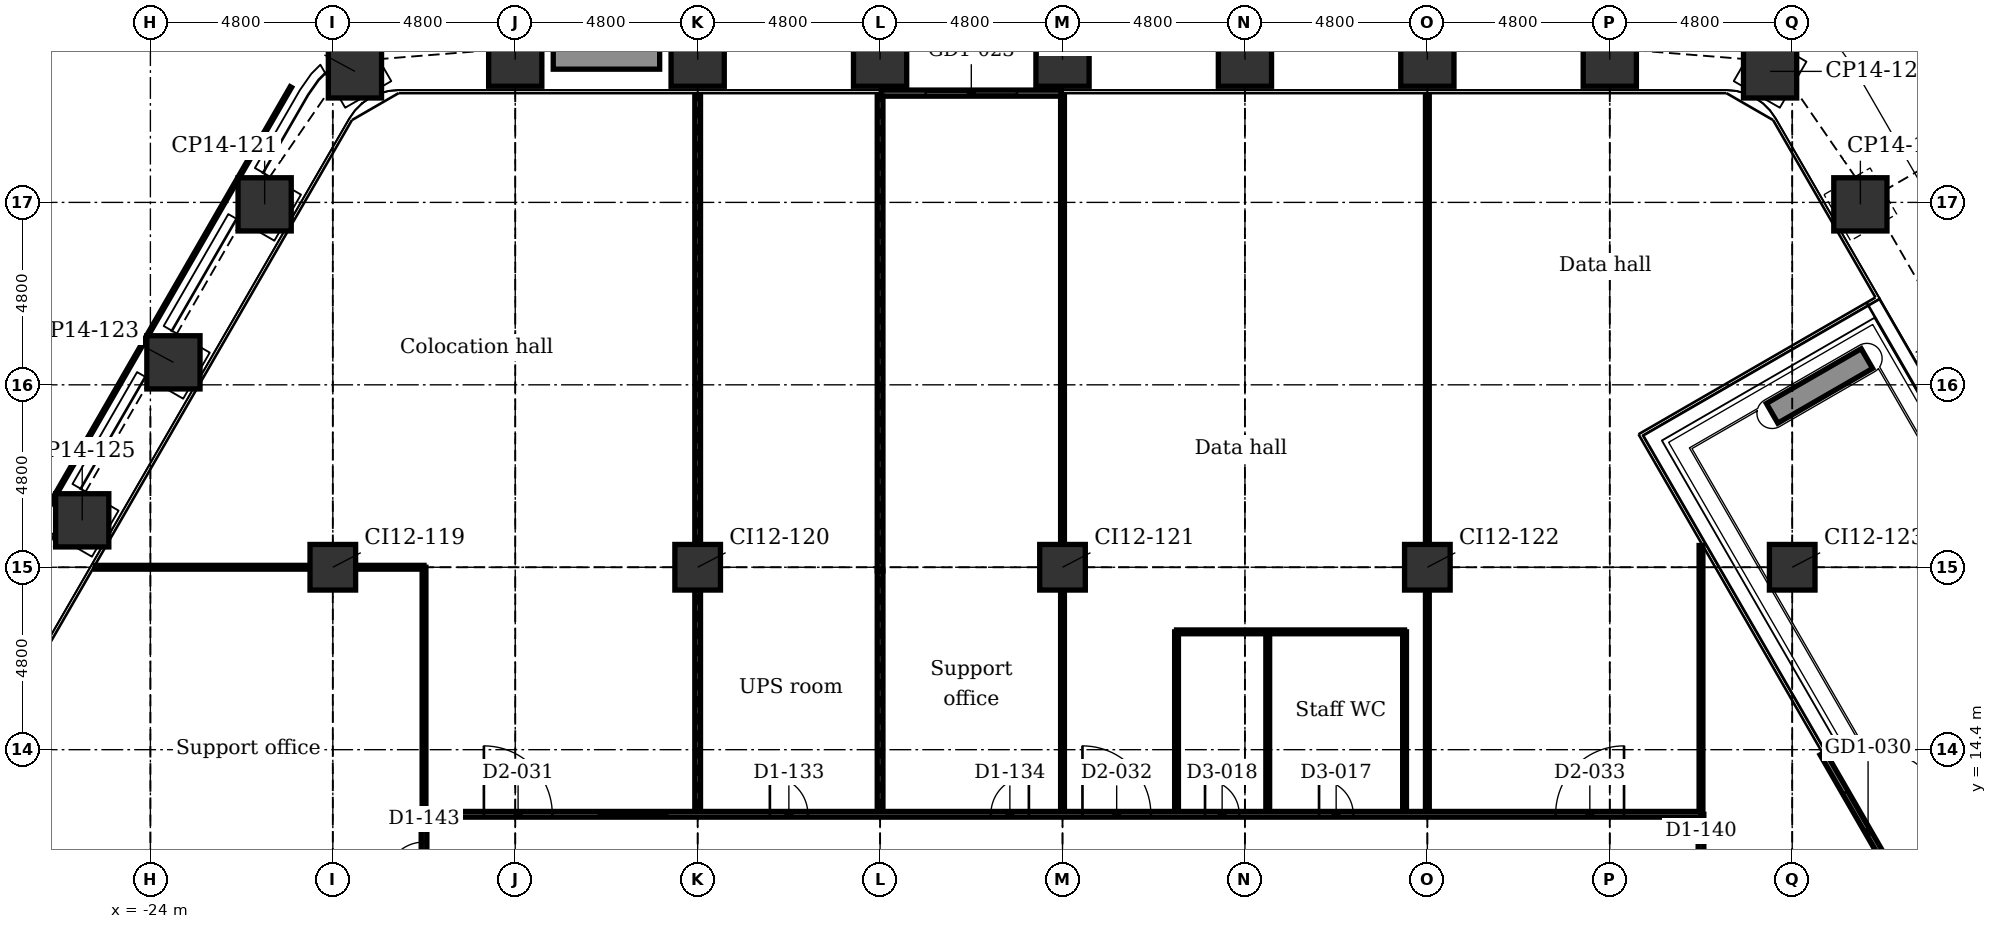
"""IFC4 building model, lengths in metres.
Left out: names, types, materials, properties, quantities, classifications, styles, units other than length and angle.
Written with IfcOpenShell. Run it as: python <this file> out.ifc"""

import sys

from ifc_helpers import new_model, si_unit, direction, frame, frame_2d, origin, origin_2d, place, context, subcontext, project, spatial, rectangle, extrude, element, fill, save


model = new_model("IFC4")
c1 = context("Model", 3, precision=1e-05, world=origin(), true_north=direction((0.0, 1.0)))
c2 = subcontext(c1, "Body", "Model", "MODEL_VIEW")
j1 = project(units=[si_unit("LENGTHUNIT", "METRE"), si_unit("PLANEANGLEUNIT", "RADIAN")], contexts=[c1])
p1 = place(None, origin())
s1 = spatial("IfcSite", under=j1, at=p1, CompositionType="ELEMENT")
p2 = place(p1, origin())
s2 = spatial("IfcBuilding", under=s1, at=p2, CompositionType="ELEMENT")
p3 = place(p2, frame((0.0, 0.0, 60.9)))
s3 = spatial("IfcBuildingStorey", under=s2, at=p3, CompositionType="ELEMENT", Elevation=60.9)
for number, where, z_axis, x_axis in (
    (1, (-18.618, 32.247, -0.25), (0.0, 0.0, 1.0), (0.866, 0.5, 0.0)),
    (2, (-14.4, 32.555, -0.25), (0.0, 0.0, 1.0), (1.0, 0.0, 0.0)),
    (3, (-9.6, 32.555, -0.25), (0.0, 0.0, 1.0), (1.0, 0.0, 0.0)),
    (4, (-4.8, 32.555, -0.25), (0.0, 0.0, 1.0), (1.0, 0.0, 0.0)),
    (5, (0.0, 32.555, -0.25), (0.0, 0.0, 1.0), (1.0, 0.0, 0.0)),
    (6, (4.8, 32.555, -0.25), (0.0, 0.0, 1.0), (1.0, 0.0, 0.0)),
    (7, (9.6, 32.555, -0.25), (0.0, 0.0, 1.0), (1.0, 0.0, 0.0)),
    (8, (14.4, 32.555, -0.25), (0.0, 0.0, 1.0), (1.0, 0.0, 0.0)),
    (9, (18.618, 32.247, -0.25), (0.0, 0.0, 1.0), (0.5, 0.866, 0.0)),
    (10, (20.994, 28.749, -0.25), (0.0, 0.0, 1.0), (0.866, 0.5, 0.0)),
    (11, (23.394, 24.592, -0.25), (0.0, 0.0, 1.0), (0.866, 0.5, 0.0)),
    (12, (-25.794, 20.435, -0.25), (0.0, 0.0, 1.0), (0.5, 0.866, 0.0)),
    (13, (-23.394, 24.592, -0.25), (0.0, 0.0, 1.0), (0.5, 0.866, 0.0)),
    (14, (-20.994, 28.749, -0.25), (0.0, 0.0, 1.0), (0.5, 0.866, 0.0)),
):
    element("IfcColumn", number, at=place(p3, frame(where, z_axis=z_axis, x_axis=x_axis)), inside=s3, PredefinedType="COLUMN", context=c2, shape_type="SweptSolid", body=[
        extrude(rectangle(XDim=1.4, YDim=1.4, at=origin_2d()), origin(), (0.0, 0.0, 1.0), 5.45),
    ])
for number, where, z_axis, x_axis in (
    (15, (-19.2, 19.2, -0.25), (0.0, 0.0, 1.0), (1.0, 0.0, 0.0)),
    (16, (-9.6, 19.2, -0.25), (0.0, 0.0, 1.0), (1.0, 0.0, 0.0)),
    (17, (0.0, 19.2, -0.25), (0.0, 0.0, 1.0), (1.0, 0.0, 0.0)),
    (18, (9.6, 19.2, -0.25), (0.0, 0.0, 1.0), (1.0, 0.0, 0.0)),
    (19, (19.2, 19.2, -0.25), (0.0, 0.0, 1.0), (1.0, 0.0, 0.0)),
):
    element("IfcColumn", number, at=place(p3, frame(where, z_axis=z_axis, x_axis=x_axis)), inside=s3, PredefinedType="COLUMN", context=c2, shape_type="SweptSolid", body=[
        extrude(rectangle(XDim=1.2, YDim=1.2, at=origin_2d()), origin(), (0.0, 0.0, 1.0), 5.45),
    ])
p4 = place(p3, frame((-4.77, 31.675, 0.0), z_axis=(0.0, 0.0, 1.0), x_axis=(1.0, 0.0, 0.0)))
e20 = element("IfcWall", 20, at=p4, inside=s3, PredefinedType="PARTITIONING", context=c2, shape_type="SweptSolid", body=[
    extrude(rectangle(XDim=4.74, YDim=0.16, at=frame_2d((2.37, 0.0))), origin(), (0.0, 0.0, 1.0), 5.2),
])
p5 = place(p4, frame((1.17, 0.0, 0.0)))
e21 = element("IfcOpeningElement", 21, at=p5, cuts=e20, PredefinedType="OPENING", context=c2, shape_type="SweptSolid", body=[
    extrude(rectangle(XDim=2.4, YDim=2.4, at=frame_2d((1.2, 1.2))), frame((0.0, 0.09, 0.0), z_axis=(0.0, -1.0, 0.0), x_axis=(1.0, 0.0, 0.0)), (0.0, 0.0, 1.0), 0.18),
])
p6 = place(p3, frame((20.003, 14.304, 0.0), z_axis=(0.0, 0.0, 1.0), x_axis=(0.500007367075, -0.86602115036, 0.0)))
e22 = element("IfcWall", 22, at=p6, inside=s3, PredefinedType="PARTITIONING", context=c2, shape_type="SweptSolid", body=[
    extrude(rectangle(XDim=4.772, YDim=0.16, at=frame_2d((2.386, 0.0))), origin(), (0.0, 0.0, 1.0), 5.2),
])
p7 = place(p6, frame((1.186, 0.0, 0.0)))
e23 = element("IfcOpeningElement", 23, at=p7, cuts=e22, PredefinedType="OPENING", context=c2, shape_type="SweptSolid", body=[
    extrude(rectangle(XDim=2.4, YDim=2.4, at=frame_2d((1.2, 1.2))), frame((0.0, 0.09, 0.0), z_axis=(0.0, -1.0, 0.0), x_axis=(1.0, 0.0, 0.0)), (0.0, 0.0, 1.0), 0.18),
])
p8 = place(p3, frame((-13.4, 32.605, 0.0), z_axis=(0.0, 0.0, 1.0), x_axis=(1.0, 0.0, 0.0)))
e24 = element("IfcWall", 24, at=p8, inside=s3, PredefinedType="USERDEFINED", context=c2, shape_type="SweptSolid", body=[
    extrude(rectangle(XDim=2.8, YDim=0.6, at=frame_2d((1.4, 0.0))), origin(), (0.0, 0.0, 1.0), 0.7),
])
p9 = place(p3, frame((18.671, 23.251, 0.0), z_axis=(0.0, 0.0, 1.0), x_axis=(0.866054314686, 0.499949921505, 0.0)))
e25 = element("IfcWall", 25, at=p9, inside=s3, PredefinedType="USERDEFINED", context=c2, shape_type="SweptSolid", body=[
    extrude(rectangle(XDim=2.88, YDim=0.6, at=frame_2d((1.44, 0.0))), origin(), (0.0, 0.0, 1.0), 0.7),
])
p10 = place(p3, frame((16.8, 12.7, 0.0), z_axis=(0.0, 0.0, 1.0), x_axis=(0.0, 1.0, 0.0)))
e26 = element("IfcWall", 26, at=p10, inside=s3, PredefinedType="PARTITIONING", context=c2, shape_type="SweptSolid", body=[
    extrude(rectangle(XDim=7.072, YDim=0.1, at=frame_2d((3.536, 0.0))), origin(), (0.0, 0.0, 1.0), 5.2),
])
p11 = place(p3, frame((16.8, 3.95, 0.0), z_axis=(0.0, 0.0, 1.0), x_axis=(0.0, 1.0, 0.0)))
e27 = element("IfcWall", 27, at=p11, inside=s3, PredefinedType="PARTITIONING", context=c2, shape_type="SweptSolid", body=[
    extrude(rectangle(XDim=8.75, YDim=0.15, at=frame_2d((4.375, 0.0))), origin(), (0.0, 0.0, 1.0), 5.2),
])
p12 = place(p11, frame((2.25, 0.0, 0.0)))
e28 = element("IfcOpeningElement", 28, at=p12, cuts=e27, PredefinedType="OPENING", context=c2, shape_type="SweptSolid", body=[
    extrude(rectangle(XDim=1.0, YDim=2.1, at=frame_2d((0.5, 1.05))), frame((0.0, 0.085, 0.0), z_axis=(0.0, -1.0, 0.0), x_axis=(1.0, 0.0, 0.0)), (0.0, 0.0, 1.0), 0.17),
])
p13 = place(p11, frame((6.7, 0.0, 0.0)))
e29 = element("IfcOpeningElement", 29, at=p13, cuts=e27, PredefinedType="OPENING", context=c2, shape_type="SweptSolid", body=[
    extrude(rectangle(XDim=1.0, YDim=2.1, at=frame_2d((0.5, 1.05))), frame((0.0, 0.085, 0.0), z_axis=(0.0, -1.0, 0.0), x_axis=(1.0, 0.0, 0.0)), (0.0, 0.0, 1.0), 0.17),
])
p14 = place(p3, frame((9.6, 12.7, 0.0), z_axis=(0.0, 0.0, 1.0), x_axis=(0.0, 1.0, 0.0)))
e30 = element("IfcWall", 30, at=p14, inside=s3, PredefinedType="PARTITIONING", context=c2, shape_type="SweptSolid", body=[
    extrude(rectangle(XDim=5.9, YDim=0.1, at=frame_2d((2.95, 0.0))), origin(), (0.0, 0.0, 1.0), 4.667),
])
p15 = place(p3, frame((9.6, 19.8, 0.0), z_axis=(0.0, 0.0, 1.0), x_axis=(0.0, 1.0, 0.0)))
e31 = element("IfcWall", 31, at=p15, inside=s3, PredefinedType="PARTITIONING", context=c2, shape_type="SweptSolid", body=[
    extrude(rectangle(XDim=11.785, YDim=0.1, at=frame_2d((5.893, 0.0))), origin(), (0.0, 0.0, 1.0), 4.516),
])
for number, where, z_axis, x_axis in (
    (32, (9.0, 12.7, 0.0), (0.0, 0.0, 1.0), (0.0, 1.0, 0.0)),
    (33, (5.4, 12.7, 0.0), (0.0, 0.0, 1.0), (0.0, 1.0, 0.0)),
    (34, (3.0, 12.7, 0.0), (0.0, 0.0, 1.0), (0.0, 1.0, 0.0)),
):
    element("IfcWall", number, at=place(p3, frame(where, z_axis=z_axis, x_axis=x_axis)), inside=s3, PredefinedType="PARTITIONING", context=c2, shape_type="SweptSolid", body=[
        extrude(rectangle(XDim=4.8, YDim=0.1, at=frame_2d((2.4, 0.0))), origin(), (0.0, 0.0, 1.0), 5.2),
    ])
p16 = place(p3, frame((0.0, 12.7, 0.0), z_axis=(0.0, 0.0, 1.0), x_axis=(0.0, 1.0, 0.0)))
e35 = element("IfcWall", 35, at=p16, inside=s3, PredefinedType="PARTITIONING", context=c2, shape_type="SweptSolid", body=[
    extrude(rectangle(XDim=5.9, YDim=0.1, at=frame_2d((2.95, 0.0))), origin(), (0.0, 0.0, 1.0), 4.667),
])
p17 = place(p3, frame((0.0, 19.8, 0.0), z_axis=(0.0, 0.0, 1.0), x_axis=(0.0, 1.0, 0.0)))
e36 = element("IfcWall", 36, at=p17, inside=s3, PredefinedType="PARTITIONING", context=c2, shape_type="SweptSolid", body=[
    extrude(rectangle(XDim=11.795, YDim=0.1, at=frame_2d((5.898, 0.0))), origin(), (0.0, 0.0, 1.0), 4.516),
])
p18 = place(p3, frame((-4.8, 19.106, 0.0), z_axis=(0.0, 0.0, 1.0), x_axis=(0.0, 1.0, 0.0)))
e37 = element("IfcWall", 37, at=p18, inside=s3, PredefinedType="PARTITIONING", context=c2, shape_type="SweptSolid", body=[
    extrude(rectangle(XDim=12.489, YDim=0.15, at=frame_2d((6.245, 0.0))), origin(), (0.0, 0.0, 1.0), 4.438),
])
p19 = place(p3, frame((-4.8, 12.7, 0.0), z_axis=(0.0, 0.0, 1.0), x_axis=(0.0, 1.0, 0.0)))
e38 = element("IfcWall", 38, at=p19, inside=s3, PredefinedType="PARTITIONING", context=c2, shape_type="SweptSolid", body=[
    extrude(rectangle(XDim=6.406, YDim=0.15, at=frame_2d((3.203, 0.0))), origin(), (0.0, 0.0, 1.0), 4.667),
])
p20 = place(p3, frame((-9.6, 12.7, 0.0), z_axis=(0.0, 0.0, 1.0), x_axis=(0.0, 1.0, 0.0)))
e39 = element("IfcWall", 39, at=p20, inside=s3, PredefinedType="PARTITIONING", context=c2, shape_type="SweptSolid", body=[
    extrude(rectangle(XDim=5.9, YDim=0.15, at=frame_2d((2.95, 0.0))), origin(), (0.0, 0.0, 1.0), 4.667),
])
p21 = place(p3, frame((-9.6, 19.8, 0.0), z_axis=(0.0, 0.0, 1.0), x_axis=(0.0, 1.0, 0.0)))
e40 = element("IfcWall", 40, at=p21, inside=s3, PredefinedType="PARTITIONING", context=c2, shape_type="SweptSolid", body=[
    extrude(rectangle(XDim=11.785, YDim=0.15, at=frame_2d((5.893, 0.0))), origin(), (0.0, 0.0, 1.0), 4.516),
])
p22 = place(p3, frame((-16.8, 12.7, 0.0), z_axis=(0.0, 0.0, 1.0), x_axis=(0.0, 1.0, 0.0)))
e41 = element("IfcWall", 41, at=p22, inside=s3, PredefinedType="PARTITIONING", context=c2, shape_type="SweptSolid", body=[
    extrude(rectangle(XDim=6.5, YDim=0.1, at=frame_2d((3.25, 0.0))), origin(), (0.0, 0.0, 1.0), 5.2),
])
p23 = place(p3, frame((-16.8, 3.95, 0.0), z_axis=(0.0, 0.0, 1.0), x_axis=(0.0, 1.0, 0.0)))
e42 = element("IfcWall", 42, at=p23, inside=s3, PredefinedType="PARTITIONING", context=c2, shape_type="SweptSolid", body=[
    extrude(rectangle(XDim=8.75, YDim=0.15, at=frame_2d((4.375, 0.0))), origin(), (0.0, 0.0, 1.0), 5.2),
])
p24 = place(p23, frame((0.95, 0.0, 0.0)))
e43 = element("IfcOpeningElement", 43, at=p24, cuts=e42, PredefinedType="OPENING", context=c2, shape_type="SweptSolid", body=[
    extrude(rectangle(XDim=1.0, YDim=2.1, at=frame_2d((0.5, 1.05))), frame((0.0, 0.085, 0.0), z_axis=(0.0, -1.0, 0.0), x_axis=(1.0, 0.0, 0.0)), (0.0, 0.0, 1.0), 0.17),
])
p25 = place(p23, frame((3.85, 0.0, 0.0)))
e44 = element("IfcOpeningElement", 44, at=p25, cuts=e42, PredefinedType="OPENING", context=c2, shape_type="SweptSolid", body=[
    extrude(rectangle(XDim=1.0, YDim=2.1, at=frame_2d((0.5, 1.05))), frame((0.0, 0.085, 0.0), z_axis=(0.0, -1.0, 0.0), x_axis=(1.0, 0.0, 0.0)), (0.0, 0.0, 1.0), 0.17),
])
p26 = place(p23, frame((7.02, 0.0, 0.0)))
e45 = element("IfcOpeningElement", 45, at=p26, cuts=e42, PredefinedType="OPENING", context=c2, shape_type="SweptSolid", body=[
    extrude(rectangle(XDim=1.0, YDim=2.1, at=frame_2d((0.5, 1.05))), frame((0.0, 0.085, 0.0), z_axis=(0.0, -1.0, 0.0), x_axis=(1.0, 0.0, 0.0)), (0.0, 0.0, 1.0), 0.17),
])
p27 = place(p3, frame((-16.8, 12.7, 0.0), z_axis=(0.0, 0.0, 1.0), x_axis=(1.0, 0.0, 0.0)))
e46 = element("IfcWall", 46, at=p27, inside=s3, PredefinedType="PARTITIONING", context=c2, shape_type="SweptSolid", body=[
    extrude(rectangle(XDim=33.6, YDim=0.15, at=frame_2d((16.8, 0.0))), origin(), (0.0, 0.0, 1.0), 5.2),
])
p28 = place(p27, frame((1.575, 0.0, 0.0)))
e47 = element("IfcOpeningElement", 47, at=p28, cuts=e46, PredefinedType="OPENING", context=c2, shape_type="SweptSolid", body=[
    extrude(rectangle(XDim=1.8, YDim=2.1, at=frame_2d((0.9, 1.05))), frame((0.0, 0.085, 0.0), z_axis=(0.0, -1.0, 0.0), x_axis=(1.0, 0.0, 0.0)), (0.0, 0.0, 1.0), 0.17),
])
p29 = place(p27, frame((9.1, 0.0, 0.0)))
e48 = element("IfcOpeningElement", 48, at=p29, cuts=e46, PredefinedType="OPENING", context=c2, shape_type="SweptSolid", body=[
    extrude(rectangle(XDim=1.0, YDim=2.1, at=frame_2d((0.5, 1.05))), frame((0.0, 0.085, 0.0), z_axis=(0.0, -1.0, 0.0), x_axis=(1.0, 0.0, 0.0)), (0.0, 0.0, 1.0), 0.17),
])
p30 = place(p27, frame((14.915, 0.0, 0.0)))
e49 = element("IfcOpeningElement", 49, at=p30, cuts=e46, PredefinedType="OPENING", context=c2, shape_type="SweptSolid", body=[
    extrude(rectangle(XDim=1.0, YDim=2.1, at=frame_2d((0.5, 1.05))), frame((0.0, 0.085, 0.0), z_axis=(0.0, -1.0, 0.0), x_axis=(1.0, 0.0, 0.0)), (0.0, 0.0, 1.0), 0.17),
])
p31 = place(p27, frame((17.325, 0.0, 0.0)))
e50 = element("IfcOpeningElement", 50, at=p31, cuts=e46, PredefinedType="OPENING", context=c2, shape_type="SweptSolid", body=[
    extrude(rectangle(XDim=1.8, YDim=2.1, at=frame_2d((0.9, 1.05))), frame((0.0, 0.085, 0.0), z_axis=(0.0, -1.0, 0.0), x_axis=(1.0, 0.0, 0.0)), (0.0, 0.0, 1.0), 0.17),
])
p32 = place(p27, frame((29.775, 0.0, 0.0)))
e51 = element("IfcOpeningElement", 51, at=p32, cuts=e46, PredefinedType="OPENING", context=c2, shape_type="SweptSolid", body=[
    extrude(rectangle(XDim=1.8, YDim=2.1, at=frame_2d((0.9, 1.05))), frame((0.0, 0.085, 0.0), z_axis=(0.0, -1.0, 0.0), x_axis=(1.0, 0.0, 0.0)), (0.0, 0.0, 1.0), 0.17),
])
p33 = place(p27, frame((23.55, 0.0, 0.0)))
e52 = element("IfcOpeningElement", 52, at=p33, cuts=e46, PredefinedType="OPENING", context=c2, shape_type="SweptSolid", body=[
    extrude(rectangle(XDim=0.9, YDim=2.1, at=frame_2d((0.45, 1.05))), frame((0.0, 0.085, 0.0), z_axis=(0.0, -1.0, 0.0), x_axis=(1.0, 0.0, 0.0)), (0.0, 0.0, 1.0), 0.17),
])
p34 = place(p27, frame((20.55, 0.0, 0.0)))
e53 = element("IfcOpeningElement", 53, at=p34, cuts=e46, PredefinedType="OPENING", context=c2, shape_type="SweptSolid", body=[
    extrude(rectangle(XDim=0.9, YDim=2.1, at=frame_2d((0.45, 1.05))), frame((0.0, 0.085, 0.0), z_axis=(0.0, -1.0, 0.0), x_axis=(1.0, 0.0, 0.0)), (0.0, 0.0, 1.0), 0.17),
])
p35 = place(p27, frame((4.6, 0.0, 0.9)))
e54 = element("IfcOpeningElement", 54, at=p35, cuts=e46, PredefinedType="OPENING", context=c2, shape_type="SweptSolid", body=[
    extrude(rectangle(XDim=1.8, YDim=1.5, at=frame_2d((0.9, 0.75))), frame((0.0, 0.085, 0.0), z_axis=(0.0, -1.0, 0.0), x_axis=(1.0, 0.0, 0.0)), (0.0, 0.0, 1.0), 0.17),
])
p36 = place(p3, frame((3.0, 17.5, 0.0), z_axis=(0.0, 0.0, 1.0), x_axis=(1.0, 0.0, 0.0)))
e55 = element("IfcWall", 55, at=p36, inside=s3, PredefinedType="PARTITIONING", context=c2, shape_type="SweptSolid", body=[
    extrude(rectangle(XDim=6.0, YDim=0.1, at=frame_2d((3.0, 0.0))), origin(), (0.0, 0.0, 1.0), 5.2),
])
p37 = place(p3, frame((-25.444, 19.2, 0.0), z_axis=(0.0, 0.0, 1.0), x_axis=(1.0, 0.0, 0.0)))
e56 = element("IfcWall", 56, at=p37, inside=s3, PredefinedType="PARTITIONING", context=c2, shape_type="SweptSolid", body=[
    extrude(rectangle(XDim=5.644, YDim=0.1, at=frame_2d((2.822, 0.0))), origin(), (0.0, 0.0, 1.0), 4.592),
])
p38 = place(p3, frame((-18.6, 19.2, 0.0), z_axis=(0.0, 0.0, 1.0), x_axis=(1.0, 0.0, 0.0)))
e57 = element("IfcWall", 57, at=p38, inside=s3, PredefinedType="PARTITIONING", context=c2, shape_type="SweptSolid", body=[
    extrude(rectangle(XDim=1.8, YDim=0.1, at=frame_2d((0.9, 0.0))), origin(), (0.0, 0.0, 1.0), 4.438),
])
p39 = place(p5, origin())
e58 = element("IfcDoor", 58, at=p39, inside=s3, OperationType="DOUBLE_DOOR_SLIDING", PredefinedType="DOOR", context=c2, shape_type="SweptSolid", body=[
    extrude(rectangle(XDim=2.4, YDim=2.4, at=frame_2d((1.2, 1.2))), frame((0.0, 0.025, 0.0), z_axis=(0.0, -1.0, 0.0), x_axis=(1.0, 0.0, 0.0)), (0.0, 0.0, 1.0), 0.05),
])
fill(e21, e58)
p40 = place(p7, origin())
e59 = element("IfcDoor", 59, at=p40, inside=s3, OperationType="DOUBLE_DOOR_SLIDING", PredefinedType="DOOR", context=c2, shape_type="SweptSolid", body=[
    extrude(rectangle(XDim=2.4, YDim=2.4, at=frame_2d((1.2, 1.2))), frame((0.0, 0.025, 0.0), z_axis=(0.0, -1.0, 0.0), x_axis=(1.0, 0.0, 0.0)), (0.0, 0.0, 1.0), 0.05),
])
fill(e23, e59)
p41 = place(p28, origin())
e60 = element("IfcDoor", 60, at=p41, inside=s3, OperationType="SINGLE_SWING_LEFT", PredefinedType="DOOR", context=c2, shape_type="SweptSolid", body=[
    extrude(rectangle(XDim=1.8, YDim=2.1, at=frame_2d((0.9, 1.05))), frame((0.0, 0.025, 0.0), z_axis=(0.0, -1.0, 0.0), x_axis=(1.0, 0.0, 0.0)), (0.0, 0.0, 1.0), 0.05),
])
fill(e47, e60)
p42 = place(p29, origin())
e61 = element("IfcDoor", 61, at=p42, inside=s3, OperationType="SINGLE_SWING_LEFT", PredefinedType="DOOR", context=c2, shape_type="SweptSolid", body=[
    extrude(rectangle(XDim=1.0, YDim=2.1, at=frame_2d((0.5, 1.05))), frame((0.0, 0.025, 0.0), z_axis=(0.0, -1.0, 0.0), x_axis=(1.0, 0.0, 0.0)), (0.0, 0.0, 1.0), 0.05),
])
fill(e48, e61)
p43 = place(p30, origin())
e62 = element("IfcDoor", 62, at=p43, inside=s3, OperationType="SINGLE_SWING_RIGHT", PredefinedType="DOOR", context=c2, shape_type="SweptSolid", body=[
    extrude(rectangle(XDim=1.0, YDim=2.1, at=frame_2d((0.5, 1.05))), frame((0.0, 0.025, 0.0), z_axis=(0.0, -1.0, 0.0), x_axis=(1.0, 0.0, 0.0)), (0.0, 0.0, 1.0), 0.05),
])
fill(e49, e62)
p44 = place(p31, origin())
e63 = element("IfcDoor", 63, at=p44, inside=s3, OperationType="SINGLE_SWING_LEFT", PredefinedType="DOOR", context=c2, shape_type="SweptSolid", body=[
    extrude(rectangle(XDim=1.8, YDim=2.1, at=frame_2d((0.9, 1.05))), frame((0.0, 0.025, 0.0), z_axis=(0.0, -1.0, 0.0), x_axis=(1.0, 0.0, 0.0)), (0.0, 0.0, 1.0), 0.05),
])
fill(e50, e63)
p45 = place(p32, origin())
e64 = element("IfcDoor", 64, at=p45, inside=s3, OperationType="SINGLE_SWING_RIGHT", PredefinedType="DOOR", context=c2, shape_type="SweptSolid", body=[
    extrude(rectangle(XDim=1.8, YDim=2.1, at=frame_2d((0.9, 1.05))), frame((0.0, 0.025, 0.0), z_axis=(0.0, -1.0, 0.0), x_axis=(1.0, 0.0, 0.0)), (0.0, 0.0, 1.0), 0.05),
])
fill(e51, e64)
p46 = place(p26, origin())
e65 = element("IfcDoor", 65, at=p46, inside=s3, OperationType="SINGLE_SWING_LEFT", PredefinedType="DOOR", context=c2, shape_type="SweptSolid", body=[
    extrude(rectangle(XDim=1.0, YDim=2.1, at=frame_2d((0.5, 1.05))), frame((0.0, 0.025, 0.0), z_axis=(0.0, -1.0, 0.0), x_axis=(1.0, 0.0, 0.0)), (0.0, 0.0, 1.0), 0.05),
])
fill(e45, e65)
p47 = place(p33, origin())
e66 = element("IfcDoor", 66, at=p47, inside=s3, OperationType="SINGLE_SWING_LEFT", PredefinedType="DOOR", context=c2, shape_type="SweptSolid", body=[
    extrude(rectangle(XDim=0.9, YDim=2.1, at=frame_2d((0.45, 1.05))), frame((0.0, 0.025, 0.0), z_axis=(0.0, -1.0, 0.0), x_axis=(1.0, 0.0, 0.0)), (0.0, 0.0, 1.0), 0.05),
])
fill(e52, e66)
p48 = place(p34, origin())
e67 = element("IfcDoor", 67, at=p48, inside=s3, OperationType="SINGLE_SWING_LEFT", PredefinedType="DOOR", context=c2, shape_type="SweptSolid", body=[
    extrude(rectangle(XDim=0.9, YDim=2.1, at=frame_2d((0.45, 1.05))), frame((0.0, 0.025, 0.0), z_axis=(0.0, -1.0, 0.0), x_axis=(1.0, 0.0, 0.0)), (0.0, 0.0, 1.0), 0.05),
])
fill(e53, e67)
p49 = place(p35, origin())
e68 = element("IfcWindow", 68, at=p49, inside=s3, PartitioningType="SINGLE_PANEL", PredefinedType="WINDOW", context=c2, shape_type="SweptSolid", body=[
    extrude(rectangle(XDim=1.8, YDim=1.5, at=frame_2d((0.9, 0.75))), frame((0.0, 0.03, 0.0), z_axis=(0.0, -1.0, 0.0), x_axis=(1.0, 0.0, 0.0)), (0.0, 0.0, 1.0), 0.06),
])
fill(e54, e68)
save(model, sys.argv[1])
